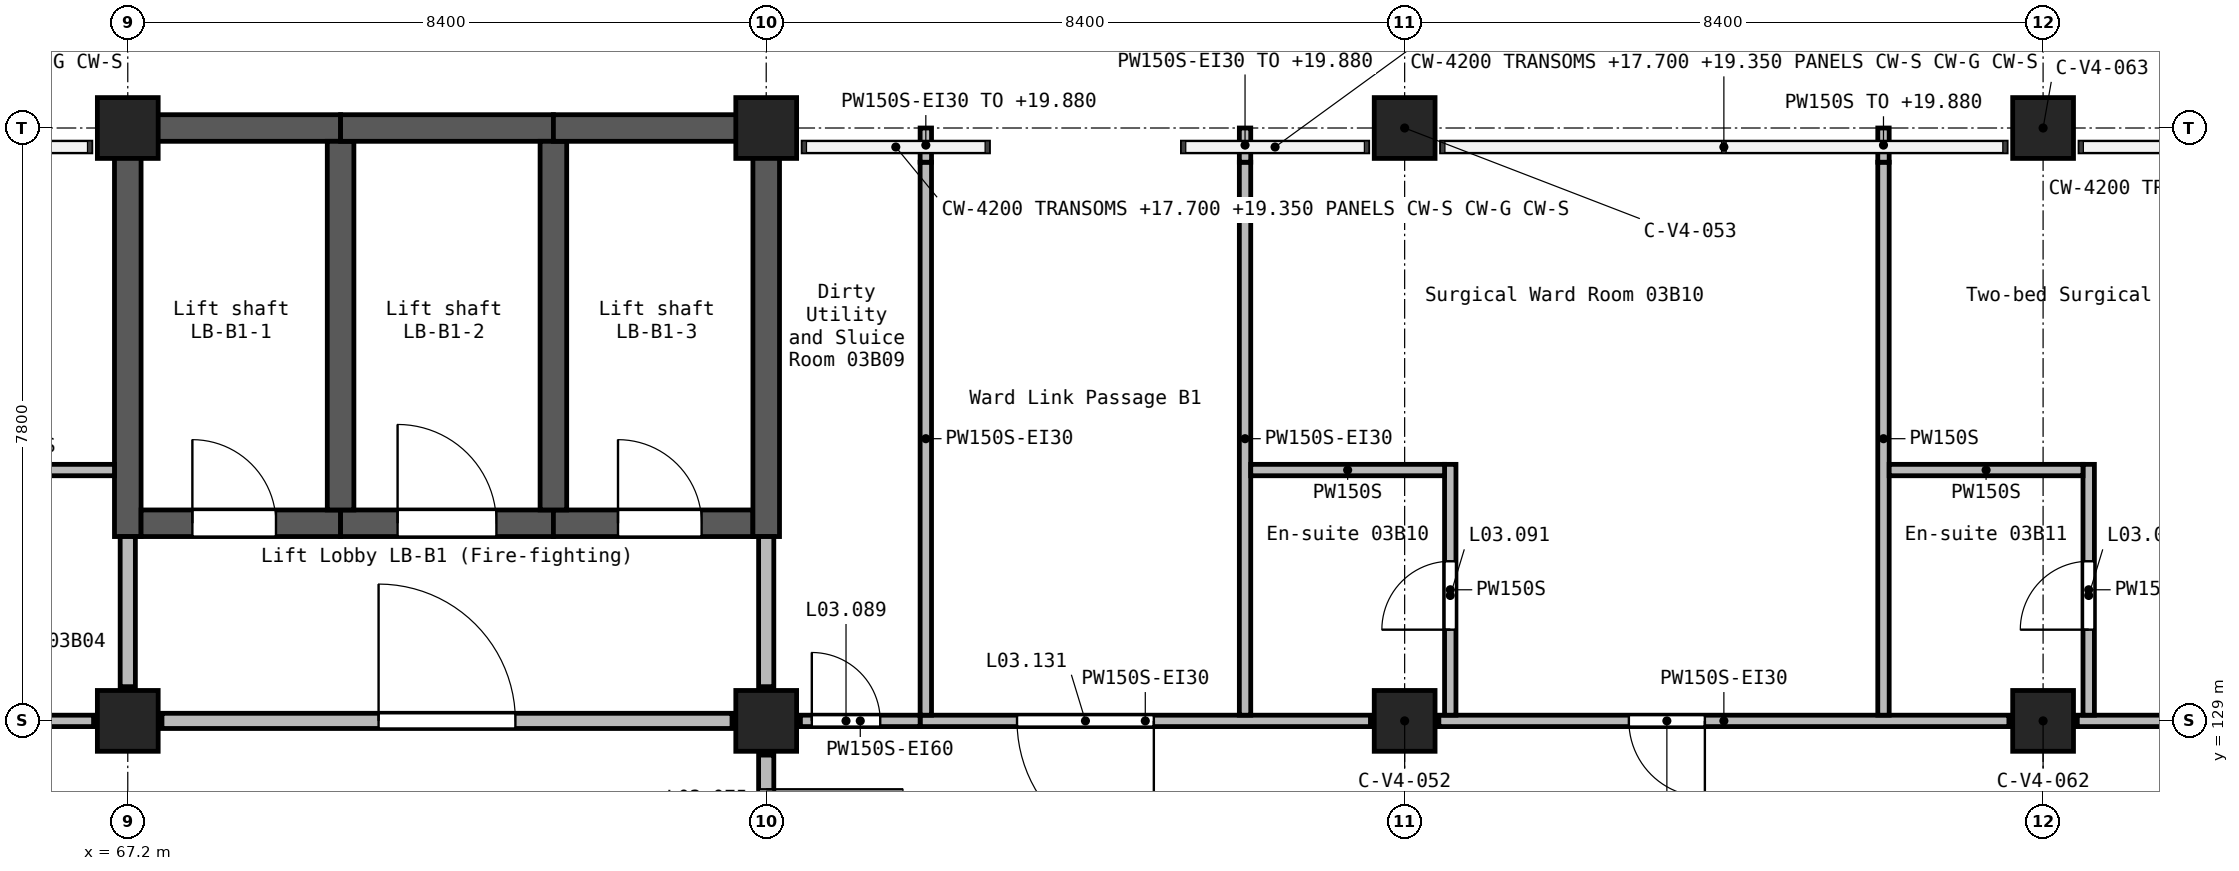
"""IFC4 building model, lengths in metres.
Left out: names, types, materials, properties, quantities, classifications, styles, units other than length and angle.
Written with IfcOpenShell. Run it as: python <this file> out.ifc"""

import sys

from ifc_helpers import new_model, si_unit, direction, frame, frame_2d, origin, origin_2d, place, context, subcontext, project, spatial, rectangle, extrude, element, fill, save


model = new_model("IFC4")
c1 = context("Model", 3, precision=1e-05, world=origin(), true_north=direction((0.0, 1.0)))
c2 = subcontext(c1, "Body", "Model", "MODEL_VIEW")
j1 = project(units=[si_unit("LENGTHUNIT", "METRE"), si_unit("PLANEANGLEUNIT", "RADIAN")], contexts=[c1])
p1 = place(None, origin())
s1 = spatial("IfcSite", under=j1, at=p1, CompositionType="ELEMENT")
p2 = place(p1, origin())
s2 = spatial("IfcBuilding", under=s1, at=p2, CompositionType="ELEMENT")
p3 = place(p2, frame((0.0, 0.0, 16.8)))
s3 = spatial("IfcBuildingStorey", under=s2, at=p3, CompositionType="ELEMENT", Elevation=16.8)
for number, where, z_axis, x_axis in (
    (1, (67.2, 129.0, 0.0), (0.0, 0.0, 1.0), (1.0, 0.0, 0.0)),
    (2, (67.2, 136.8, 0.0), (0.0, 0.0, 1.0), (1.0, 0.0, 0.0)),
    (3, (75.6, 129.0, 0.0), (0.0, 0.0, 1.0), (1.0, 0.0, 0.0)),
    (4, (75.6, 136.8, 0.0), (0.0, 0.0, 1.0), (1.0, 0.0, 0.0)),
    (5, (84.0, 129.0, 0.0), (0.0, 0.0, 1.0), (1.0, 0.0, 0.0)),
    (6, (84.0, 136.8, 0.0), (0.0, 0.0, 1.0), (1.0, 0.0, 0.0)),
    (7, (92.4, 129.0, 0.0), (0.0, 0.0, 1.0), (1.0, 0.0, 0.0)),
    (8, (92.4, 136.8, 0.0), (0.0, 0.0, 1.0), (1.0, 0.0, 0.0)),
):
    element("IfcColumn", number, at=place(p3, frame(where, z_axis=z_axis, x_axis=x_axis)), inside=s3, PredefinedType="COLUMN", context=c2, shape_type="SweptSolid", body=[
        extrude(rectangle(XDim=0.8, YDim=0.8, at=origin_2d()), origin(), (0.0, 0.0, 1.0), 4.2),
    ])
p4 = place(p3, frame((67.025, 136.8, 0.0), z_axis=(0.0, 0.0, 1.0), x_axis=(1.0, 0.0, 0.0)))
e9 = element("IfcWall", 9, at=p4, inside=s3, PredefinedType="SHEAR", context=c2, shape_type="SweptSolid", body=[
    extrude(rectangle(XDim=2.975, YDim=0.35, at=frame_2d((1.488, 0.0))), origin(), (0.0, 0.0, 1.0), 4.2),
])
p5 = place(p3, frame((67.2, 131.425, 0.0), z_axis=(0.0, 0.0, 1.0), x_axis=(0.0, 1.0, 0.0)))
e10 = element("IfcWall", 10, at=p5, inside=s3, PredefinedType="SHEAR", context=c2, shape_type="SweptSolid", body=[
    extrude(rectangle(XDim=5.2, YDim=0.35, at=frame_2d((2.6, 0.0))), origin(), (0.0, 0.0, 1.0), 4.2),
])
p6 = place(p3, frame((67.375, 131.6, 0.0), z_axis=(0.0, 0.0, 1.0), x_axis=(1.0, 0.0, 0.0)))
e11 = element("IfcWall", 11, at=p6, inside=s3, PredefinedType="SHEAR", context=c2, shape_type="SweptSolid", body=[
    extrude(rectangle(XDim=2.625, YDim=0.35, at=frame_2d((1.312, 0.0))), origin(), (0.0, 0.0, 1.0), 4.2),
])
p7 = place(p6, frame((0.675, 0.0, 0.0)))
e12 = element("IfcOpeningElement", 12, at=p7, cuts=e11, PredefinedType="OPENING", context=c2, shape_type="SweptSolid", body=[
    extrude(rectangle(XDim=1.1, YDim=2.1, at=frame_2d((0.55, 1.05))), frame((0.0, 0.185, 0.0), z_axis=(0.0, -1.0, 0.0), x_axis=(1.0, 0.0, 0.0)), (0.0, 0.0, 1.0), 0.37),
])
p8 = place(p3, frame((70.0, 131.6, 0.0), z_axis=(0.0, 0.0, 1.0), x_axis=(1.0, 0.0, 0.0)))
e13 = element("IfcWall", 13, at=p8, inside=s3, PredefinedType="SHEAR", context=c2, shape_type="SweptSolid", body=[
    extrude(rectangle(XDim=2.8, YDim=0.35, at=frame_2d((1.4, 0.0))), origin(), (0.0, 0.0, 1.0), 4.2),
])
p9 = place(p8, frame((0.75, 0.0, 0.0)))
e14 = element("IfcOpeningElement", 14, at=p9, cuts=e13, PredefinedType="OPENING", context=c2, shape_type="SweptSolid", body=[
    extrude(rectangle(XDim=1.3, YDim=2.1, at=frame_2d((0.65, 1.05))), frame((0.0, 0.185, 0.0), z_axis=(0.0, -1.0, 0.0), x_axis=(1.0, 0.0, 0.0)), (0.0, 0.0, 1.0), 0.37),
])
p10 = place(p3, frame((70.0, 131.775, 0.0), z_axis=(0.0, 0.0, 1.0), x_axis=(0.0, 1.0, 0.0)))
e15 = element("IfcWall", 15, at=p10, inside=s3, PredefinedType="SHEAR", context=c2, shape_type="SweptSolid", body=[
    extrude(rectangle(XDim=4.85, YDim=0.35, at=frame_2d((2.425, 0.0))), origin(), (0.0, 0.0, 1.0), 4.2),
])
p11 = place(p3, frame((70.0, 136.8, 0.0), z_axis=(0.0, 0.0, 1.0), x_axis=(1.0, 0.0, 0.0)))
e16 = element("IfcWall", 16, at=p11, inside=s3, PredefinedType="SHEAR", context=c2, shape_type="SweptSolid", body=[
    extrude(rectangle(XDim=2.8, YDim=0.35, at=frame_2d((1.4, 0.0))), origin(), (0.0, 0.0, 1.0), 4.2),
])
p12 = place(p3, frame((72.8, 131.6, 0.0), z_axis=(0.0, 0.0, 1.0), x_axis=(1.0, 0.0, 0.0)))
e17 = element("IfcWall", 17, at=p12, inside=s3, PredefinedType="SHEAR", context=c2, shape_type="SweptSolid", body=[
    extrude(rectangle(XDim=2.625, YDim=0.35, at=frame_2d((1.312, 0.0))), origin(), (0.0, 0.0, 1.0), 4.2),
])
p13 = place(p12, frame((0.85, 0.0, 0.0)))
e18 = element("IfcOpeningElement", 18, at=p13, cuts=e17, PredefinedType="OPENING", context=c2, shape_type="SweptSolid", body=[
    extrude(rectangle(XDim=1.1, YDim=2.1, at=frame_2d((0.55, 1.05))), frame((0.0, 0.185, 0.0), z_axis=(0.0, -1.0, 0.0), x_axis=(1.0, 0.0, 0.0)), (0.0, 0.0, 1.0), 0.37),
])
p14 = place(p3, frame((72.8, 131.775, 0.0), z_axis=(0.0, 0.0, 1.0), x_axis=(0.0, 1.0, 0.0)))
e19 = element("IfcWall", 19, at=p14, inside=s3, PredefinedType="SHEAR", context=c2, shape_type="SweptSolid", body=[
    extrude(rectangle(XDim=4.85, YDim=0.35, at=frame_2d((2.425, 0.0))), origin(), (0.0, 0.0, 1.0), 4.2),
])
p15 = place(p3, frame((72.8, 136.8, 0.0), z_axis=(0.0, 0.0, 1.0), x_axis=(1.0, 0.0, 0.0)))
e20 = element("IfcWall", 20, at=p15, inside=s3, PredefinedType="SHEAR", context=c2, shape_type="SweptSolid", body=[
    extrude(rectangle(XDim=2.625, YDim=0.35, at=frame_2d((1.312, 0.0))), origin(), (0.0, 0.0, 1.0), 4.2),
])
p16 = place(p3, frame((75.6, 131.425, 0.0), z_axis=(0.0, 0.0, 1.0), x_axis=(0.0, 1.0, 0.0)))
e21 = element("IfcWall", 21, at=p16, inside=s3, PredefinedType="SHEAR", context=c2, shape_type="SweptSolid", body=[
    extrude(rectangle(XDim=5.55, YDim=0.35, at=frame_2d((2.775, 0.0))), origin(), (0.0, 0.0, 1.0), 4.2),
])
p17 = place(p3, frame((75.6, 131.425, 0.0), z_axis=(0.0, 0.0, 1.0), x_axis=(0.0, -1.0, 0.0)))
e22 = element("IfcWall", 22, at=p17, inside=s3, PredefinedType="SOLIDWALL", context=c2, shape_type="SweptSolid", body=[
    extrude(rectangle(XDim=1.975, YDim=0.2, at=frame_2d((0.988, 0.0))), origin(), (0.0, 0.0, 1.0), 3.9),
])
p18 = place(p3, frame((75.6, 128.55, 0.0), z_axis=(0.0, 0.0, 1.0), x_axis=(0.0, -1.0, 0.0)))
e23 = element("IfcWall", 23, at=p18, inside=s3, PredefinedType="SOLIDWALL", context=c2, shape_type="SweptSolid", body=[
    extrude(rectangle(XDim=2.7, YDim=0.2, at=frame_2d((1.35, 0.0))), origin(), (0.0, 0.0, 1.0), 3.9),
])
p19 = place(p18, frame((0.45, 0.0, 0.0)))
e24 = element("IfcOpeningElement", 24, at=p19, cuts=e23, PredefinedType="OPENING", context=c2, shape_type="SweptSolid", body=[
    extrude(rectangle(XDim=1.8, YDim=2.1, at=frame_2d((0.9, 1.05))), frame((0.0, 0.11, 0.0), z_axis=(0.0, -1.0, 0.0), x_axis=(1.0, 0.0, 0.0)), (0.0, 0.0, 1.0), 0.22),
])
p20 = place(p3, frame((67.65, 129.0, 0.0), z_axis=(0.0, 0.0, 1.0), x_axis=(1.0, 0.0, 0.0)))
e25 = element("IfcWall", 25, at=p20, inside=s3, PredefinedType="SOLIDWALL", context=c2, shape_type="SweptSolid", body=[
    extrude(rectangle(XDim=7.5, YDim=0.2, at=frame_2d((3.75, 0.0))), origin(), (0.0, 0.0, 1.0), 3.9),
])
p21 = place(p20, frame((2.85, 0.0, 0.0)))
e26 = element("IfcOpeningElement", 26, at=p21, cuts=e25, PredefinedType="OPENING", context=c2, shape_type="SweptSolid", body=[
    extrude(rectangle(XDim=1.8, YDim=2.1, at=frame_2d((0.9, 1.05))), frame((0.0, 0.11, 0.0), z_axis=(0.0, -1.0, 0.0), x_axis=(1.0, 0.0, 0.0)), (0.0, 0.0, 1.0), 0.22),
])
p22 = place(p3, frame((67.2, 129.45, 0.0), z_axis=(0.0, 0.0, 1.0), x_axis=(0.0, 1.0, 0.0)))
e27 = element("IfcWall", 27, at=p22, inside=s3, PredefinedType="SOLIDWALL", context=c2, shape_type="SweptSolid", body=[
    extrude(rectangle(XDim=1.975, YDim=0.2, at=frame_2d((0.988, 0.0))), origin(), (0.0, 0.0, 1.0), 3.9),
])
p23 = place(p3, frame((100.35, 129.0, 0.0), z_axis=(0.0, 0.0, 1.0), x_axis=(-1.0, 0.0, 0.0)))
e28 = element("IfcWall", 28, at=p23, inside=s3, PredefinedType="PARTITIONING", context=c2, shape_type="SweptSolid", body=[
    extrude(rectangle(XDim=7.5, YDim=0.15, at=frame_2d((3.75, 0.0))), origin(), (0.0, 0.0, 1.0), 3.9),
])
p24 = place(p23, frame((5.05, 0.0, 0.0)))
e29 = element("IfcOpeningElement", 29, at=p24, cuts=e28, PredefinedType="OPENING", context=c2, shape_type="SweptSolid", body=[
    extrude(rectangle(XDim=1.0, YDim=2.1, at=frame_2d((0.5, 1.05))), frame((0.0, 0.085, 0.0), z_axis=(0.0, -1.0, 0.0), x_axis=(1.0, 0.0, 0.0)), (0.0, 0.0, 1.0), 0.17),
])
p25 = place(p23, frame((0.1, 0.0, 0.0)))
e30 = element("IfcOpeningElement", 30, at=p25, cuts=e28, PredefinedType="OPENING", context=c2, shape_type="SweptSolid", body=[
    extrude(rectangle(XDim=1.8, YDim=2.1, at=frame_2d((0.9, 1.05))), frame((0.0, 0.085, 0.0), z_axis=(0.0, -1.0, 0.0), x_axis=(1.0, 0.0, 0.0)), (0.0, 0.0, 1.0), 0.17),
])
p26 = place(p3, frame((91.95, 129.0, 0.0), z_axis=(0.0, 0.0, 1.0), x_axis=(-1.0, 0.0, 0.0)))
e31 = element("IfcWall", 31, at=p26, inside=s3, PredefinedType="PARTITIONING", context=c2, shape_type="SweptSolid", body=[
    extrude(rectangle(XDim=7.5, YDim=0.15, at=frame_2d((3.75, 0.0))), origin(), (0.0, 0.0, 1.0), 3.9),
])
p27 = place(p26, frame((4.0, 0.0, 0.0)))
e32 = element("IfcOpeningElement", 32, at=p27, cuts=e31, PredefinedType="OPENING", context=c2, shape_type="SweptSolid", body=[
    extrude(rectangle(XDim=1.0, YDim=2.1, at=frame_2d((0.5, 1.05))), frame((0.0, 0.085, 0.0), z_axis=(0.0, -1.0, 0.0), x_axis=(1.0, 0.0, 0.0)), (0.0, 0.0, 1.0), 0.17),
])
p28 = place(p3, frame((83.55, 129.0, 0.0), z_axis=(0.0, 0.0, 1.0), x_axis=(-1.0, 0.0, 0.0)))
e33 = element("IfcWall", 33, at=p28, inside=s3, PredefinedType="PARTITIONING", context=c2, shape_type="SweptSolid", body=[
    extrude(rectangle(XDim=5.925, YDim=0.15, at=frame_2d((2.962, 0.0))), origin(), (0.0, 0.0, 1.0), 3.9),
])
p29 = place(p28, frame((2.85, 0.0, 0.0)))
e34 = element("IfcOpeningElement", 34, at=p29, cuts=e33, PredefinedType="OPENING", context=c2, shape_type="SweptSolid", body=[
    extrude(rectangle(XDim=1.8, YDim=2.1, at=frame_2d((0.9, 1.05))), frame((0.0, 0.085, 0.0), z_axis=(0.0, -1.0, 0.0), x_axis=(1.0, 0.0, 0.0)), (0.0, 0.0, 1.0), 0.17),
])
p30 = place(p3, frame((66.75, 129.0, 0.0), z_axis=(0.0, 0.0, 1.0), x_axis=(-1.0, 0.0, 0.0)))
e35 = element("IfcWall", 35, at=p30, inside=s3, PredefinedType="PARTITIONING", context=c2, shape_type="SweptSolid", body=[
    extrude(rectangle(XDim=7.5, YDim=0.15, at=frame_2d((3.75, 0.0))), origin(), (0.0, 0.0, 1.0), 3.9),
])
p31 = place(p30, frame((3.55, 0.0, 0.0)))
e36 = element("IfcOpeningElement", 36, at=p31, cuts=e35, PredefinedType="OPENING", context=c2, shape_type="SweptSolid", body=[
    extrude(rectangle(XDim=1.0, YDim=2.1, at=frame_2d((0.5, 1.05))), frame((0.0, 0.085, 0.0), z_axis=(0.0, -1.0, 0.0), x_axis=(1.0, 0.0, 0.0)), (0.0, 0.0, 1.0), 0.17),
])
p32 = place(p3, frame((77.7, 129.075, 0.0), z_axis=(0.0, 0.0, 1.0), x_axis=(0.0, 1.0, 0.0)))
e37 = element("IfcWall", 37, at=p32, inside=s3, PredefinedType="PARTITIONING", context=c2, shape_type="SweptSolid", body=[
    extrude(rectangle(XDim=7.275, YDim=0.15, at=frame_2d((3.638, 0.0))), origin(), (0.0, 0.0, 1.0), 3.9),
])
p33 = place(p3, frame((77.7, 136.35, 0.0), z_axis=(0.0, 0.0, 1.0), x_axis=(0.0, 1.0, 0.0)))
e38 = element("IfcWall", 38, at=p33, inside=s3, PredefinedType="PARTITIONING", context=c2, shape_type="SweptSolid", body=[
    extrude(rectangle(XDim=0.45, YDim=0.15, at=frame_2d((0.225, 0.0))), origin(), (0.0, 0.0, 1.0), 3.08),
])
p34 = place(p3, frame((81.9, 129.075, 0.0), z_axis=(0.0, 0.0, 1.0), x_axis=(0.0, 1.0, 0.0)))
e39 = element("IfcWall", 39, at=p34, inside=s3, PredefinedType="PARTITIONING", context=c2, shape_type="SweptSolid", body=[
    extrude(rectangle(XDim=7.275, YDim=0.15, at=frame_2d((3.638, 0.0))), origin(), (0.0, 0.0, 1.0), 3.9),
])
p35 = place(p3, frame((81.9, 136.35, 0.0), z_axis=(0.0, 0.0, 1.0), x_axis=(0.0, 1.0, 0.0)))
e40 = element("IfcWall", 40, at=p35, inside=s3, PredefinedType="PARTITIONING", context=c2, shape_type="SweptSolid", body=[
    extrude(rectangle(XDim=0.45, YDim=0.15, at=frame_2d((0.225, 0.0))), origin(), (0.0, 0.0, 1.0), 3.08),
])
p36 = place(p3, frame((76.05, 129.0, 0.0), z_axis=(0.0, 0.0, 1.0), x_axis=(1.0, 0.0, 0.0)))
e41 = element("IfcWall", 41, at=p36, inside=s3, PredefinedType="PARTITIONING", context=c2, shape_type="SweptSolid", body=[
    extrude(rectangle(XDim=1.575, YDim=0.15, at=frame_2d((0.788, 0.0))), origin(), (0.0, 0.0, 1.0), 3.9),
])
p37 = place(p36, frame((0.15, 0.0, 0.0)))
e42 = element("IfcOpeningElement", 42, at=p37, cuts=e41, PredefinedType="OPENING", context=c2, shape_type="SweptSolid", body=[
    extrude(rectangle(XDim=0.9, YDim=2.1, at=frame_2d((0.45, 1.05))), frame((0.0, 0.085, 0.0), z_axis=(0.0, -1.0, 0.0), x_axis=(1.0, 0.0, 0.0)), (0.0, 0.0, 1.0), 0.17),
])
p38 = place(p3, frame((90.3, 129.075, 0.0), z_axis=(0.0, 0.0, 1.0), x_axis=(0.0, 1.0, 0.0)))
e43 = element("IfcWall", 43, at=p38, inside=s3, PredefinedType="PARTITIONING", context=c2, shape_type="SweptSolid", body=[
    extrude(rectangle(XDim=7.275, YDim=0.15, at=frame_2d((3.638, 0.0))), origin(), (0.0, 0.0, 1.0), 3.9),
])
p39 = place(p3, frame((90.3, 136.35, 0.0), z_axis=(0.0, 0.0, 1.0), x_axis=(0.0, 1.0, 0.0)))
e44 = element("IfcWall", 44, at=p39, inside=s3, PredefinedType="PARTITIONING", context=c2, shape_type="SweptSolid", body=[
    extrude(rectangle(XDim=0.45, YDim=0.15, at=frame_2d((0.225, 0.0))), origin(), (0.0, 0.0, 1.0), 3.08),
])
p40 = place(p3, frame((84.6, 129.075, 0.0), z_axis=(0.0, 0.0, 1.0), x_axis=(0.0, 1.0, 0.0)))
e45 = element("IfcWall", 45, at=p40, inside=s3, PredefinedType="PARTITIONING", context=c2, shape_type="SweptSolid", body=[
    extrude(rectangle(XDim=3.3, YDim=0.15, at=frame_2d((1.65, 0.0))), origin(), (0.0, 0.0, 1.0), 3.9),
])
p41 = place(p40, frame((1.125, 0.0, 0.0)))
e46 = element("IfcOpeningElement", 46, at=p41, cuts=e45, PredefinedType="OPENING", context=c2, shape_type="SweptSolid", body=[
    extrude(rectangle(XDim=0.9, YDim=2.1, at=frame_2d((0.45, 1.05))), frame((0.0, 0.085, 0.0), z_axis=(0.0, -1.0, 0.0), x_axis=(1.0, 0.0, 0.0)), (0.0, 0.0, 1.0), 0.17),
])
p42 = place(p3, frame((93.0, 129.075, 0.0), z_axis=(0.0, 0.0, 1.0), x_axis=(0.0, 1.0, 0.0)))
e47 = element("IfcWall", 47, at=p42, inside=s3, PredefinedType="PARTITIONING", context=c2, shape_type="SweptSolid", body=[
    extrude(rectangle(XDim=3.3, YDim=0.15, at=frame_2d((1.65, 0.0))), origin(), (0.0, 0.0, 1.0), 3.9),
])
p43 = place(p42, frame((1.125, 0.0, 0.0)))
e48 = element("IfcOpeningElement", 48, at=p43, cuts=e47, PredefinedType="OPENING", context=c2, shape_type="SweptSolid", body=[
    extrude(rectangle(XDim=0.9, YDim=2.1, at=frame_2d((0.45, 1.05))), frame((0.0, 0.085, 0.0), z_axis=(0.0, -1.0, 0.0), x_axis=(1.0, 0.0, 0.0)), (0.0, 0.0, 1.0), 0.17),
])
p44 = place(p3, frame((64.575, 132.3, 0.0), z_axis=(0.0, 0.0, 1.0), x_axis=(1.0, 0.0, 0.0)))
e49 = element("IfcWall", 49, at=p44, inside=s3, PredefinedType="PARTITIONING", context=c2, shape_type="SweptSolid", body=[
    extrude(rectangle(XDim=2.45, YDim=0.15, at=frame_2d((1.225, 0.0))), origin(), (0.0, 0.0, 1.0), 3.9),
])
p45 = place(p3, frame((90.375, 132.3, 0.0), z_axis=(0.0, 0.0, 1.0), x_axis=(1.0, 0.0, 0.0)))
e50 = element("IfcWall", 50, at=p45, inside=s3, PredefinedType="PARTITIONING", context=c2, shape_type="SweptSolid", body=[
    extrude(rectangle(XDim=2.55, YDim=0.15, at=frame_2d((1.275, 0.0))), origin(), (0.0, 0.0, 1.0), 3.9),
])
p46 = place(p3, frame((81.975, 132.3, 0.0), z_axis=(0.0, 0.0, 1.0), x_axis=(1.0, 0.0, 0.0)))
e51 = element("IfcWall", 51, at=p46, inside=s3, PredefinedType="PARTITIONING", context=c2, shape_type="SweptSolid", body=[
    extrude(rectangle(XDim=2.55, YDim=0.15, at=frame_2d((1.275, 0.0))), origin(), (0.0, 0.0, 1.0), 3.9),
])
p47 = place(p19, origin())
e52 = element("IfcDoor", 52, at=p47, inside=s3, OperationType="DOUBLE_DOOR_SINGLE_SWING", PredefinedType="DOOR", context=c2, shape_type="SweptSolid", body=[
    extrude(rectangle(XDim=1.8, YDim=2.1, at=frame_2d((0.9, 1.05))), frame((0.0, 0.025, 0.0), z_axis=(0.0, -1.0, 0.0), x_axis=(1.0, 0.0, 0.0)), (0.0, 0.0, 1.0), 0.05),
])
fill(e24, e52)
p48 = place(p37, origin())
e53 = element("IfcDoor", 53, at=p48, inside=s3, OperationType="SINGLE_SWING_LEFT", PredefinedType="DOOR", context=c2, shape_type="SweptSolid", body=[
    extrude(rectangle(XDim=0.9, YDim=2.1, at=frame_2d((0.45, 1.05))), frame((0.0, 0.025, 0.0), z_axis=(0.0, -1.0, 0.0), x_axis=(1.0, 0.0, 0.0)), (0.0, 0.0, 1.0), 0.05),
])
fill(e42, e53)
p49 = place(p27, frame((1.0, 0.0, 0.0), z_axis=(0.0, 0.0, 1.0), x_axis=(-1.0, 0.0, 0.0)))
e54 = element("IfcDoor", 54, at=p49, inside=s3, OperationType="SINGLE_SWING_LEFT", PredefinedType="DOOR", context=c2, shape_type="SweptSolid", body=[
    extrude(rectangle(XDim=1.0, YDim=2.1, at=frame_2d((0.5, 1.05))), frame((0.0, 0.025, 0.0), z_axis=(0.0, -1.0, 0.0), x_axis=(1.0, 0.0, 0.0)), (0.0, 0.0, 1.0), 0.05),
])
fill(e32, e54)
p50 = place(p41, origin())
e55 = element("IfcDoor", 55, at=p50, inside=s3, OperationType="SINGLE_SWING_LEFT", PredefinedType="DOOR", context=c2, shape_type="SweptSolid", body=[
    extrude(rectangle(XDim=0.9, YDim=2.1, at=frame_2d((0.45, 1.05))), frame((0.0, 0.025, 0.0), z_axis=(0.0, -1.0, 0.0), x_axis=(1.0, 0.0, 0.0)), (0.0, 0.0, 1.0), 0.05),
])
fill(e46, e55)
p51 = place(p43, origin())
e56 = element("IfcDoor", 56, at=p51, inside=s3, OperationType="SINGLE_SWING_LEFT", PredefinedType="DOOR", context=c2, shape_type="SweptSolid", body=[
    extrude(rectangle(XDim=0.9, YDim=2.1, at=frame_2d((0.45, 1.05))), frame((0.0, 0.025, 0.0), z_axis=(0.0, -1.0, 0.0), x_axis=(1.0, 0.0, 0.0)), (0.0, 0.0, 1.0), 0.05),
])
fill(e48, e56)
p52 = place(p29, frame((1.8, 0.0, 0.0), z_axis=(0.0, 0.0, 1.0), x_axis=(-1.0, 0.0, 0.0)))
e57 = element("IfcDoor", 57, at=p52, inside=s3, OperationType="DOUBLE_DOOR_SINGLE_SWING", PredefinedType="DOOR", context=c2, shape_type="SweptSolid", body=[
    extrude(rectangle(XDim=1.8, YDim=2.1, at=frame_2d((0.9, 1.05))), frame((0.0, 0.025, 0.0), z_axis=(0.0, -1.0, 0.0), x_axis=(1.0, 0.0, 0.0)), (0.0, 0.0, 1.0), 0.05),
])
fill(e34, e57)
p53 = place(p21, origin())
e58 = element("IfcDoor", 58, at=p53, inside=s3, OperationType="DOUBLE_DOOR_SINGLE_SWING", PredefinedType="DOOR", context=c2, shape_type="SweptSolid", body=[
    extrude(rectangle(XDim=1.8, YDim=2.1, at=frame_2d((0.9, 1.05))), frame((0.0, 0.025, 0.0), z_axis=(0.0, -1.0, 0.0), x_axis=(1.0, 0.0, 0.0)), (0.0, 0.0, 1.0), 0.05),
])
fill(e26, e58)
p54 = place(p7, origin())
e59 = element("IfcDoor", 59, at=p54, inside=s3, OperationType="DOUBLE_DOOR_SLIDING", PredefinedType="DOOR", context=c2, shape_type="SweptSolid", body=[
    extrude(rectangle(XDim=1.1, YDim=2.1, at=frame_2d((0.55, 1.05))), frame((0.0, 0.025, 0.0), z_axis=(0.0, -1.0, 0.0), x_axis=(1.0, 0.0, 0.0)), (0.0, 0.0, 1.0), 0.05),
])
fill(e12, e59)
p55 = place(p9, origin())
e60 = element("IfcDoor", 60, at=p55, inside=s3, OperationType="DOUBLE_DOOR_SLIDING", PredefinedType="DOOR", context=c2, shape_type="SweptSolid", body=[
    extrude(rectangle(XDim=1.3, YDim=2.1, at=frame_2d((0.65, 1.05))), frame((0.0, 0.025, 0.0), z_axis=(0.0, -1.0, 0.0), x_axis=(1.0, 0.0, 0.0)), (0.0, 0.0, 1.0), 0.05),
])
fill(e14, e60)
p56 = place(p13, origin())
e61 = element("IfcDoor", 61, at=p56, inside=s3, OperationType="DOUBLE_DOOR_SLIDING", PredefinedType="DOOR", context=c2, shape_type="SweptSolid", body=[
    extrude(rectangle(XDim=1.1, YDim=2.1, at=frame_2d((0.55, 1.05))), frame((0.0, 0.025, 0.0), z_axis=(0.0, -1.0, 0.0), x_axis=(1.0, 0.0, 0.0)), (0.0, 0.0, 1.0), 0.05),
])
fill(e18, e61)
save(model, sys.argv[1])
